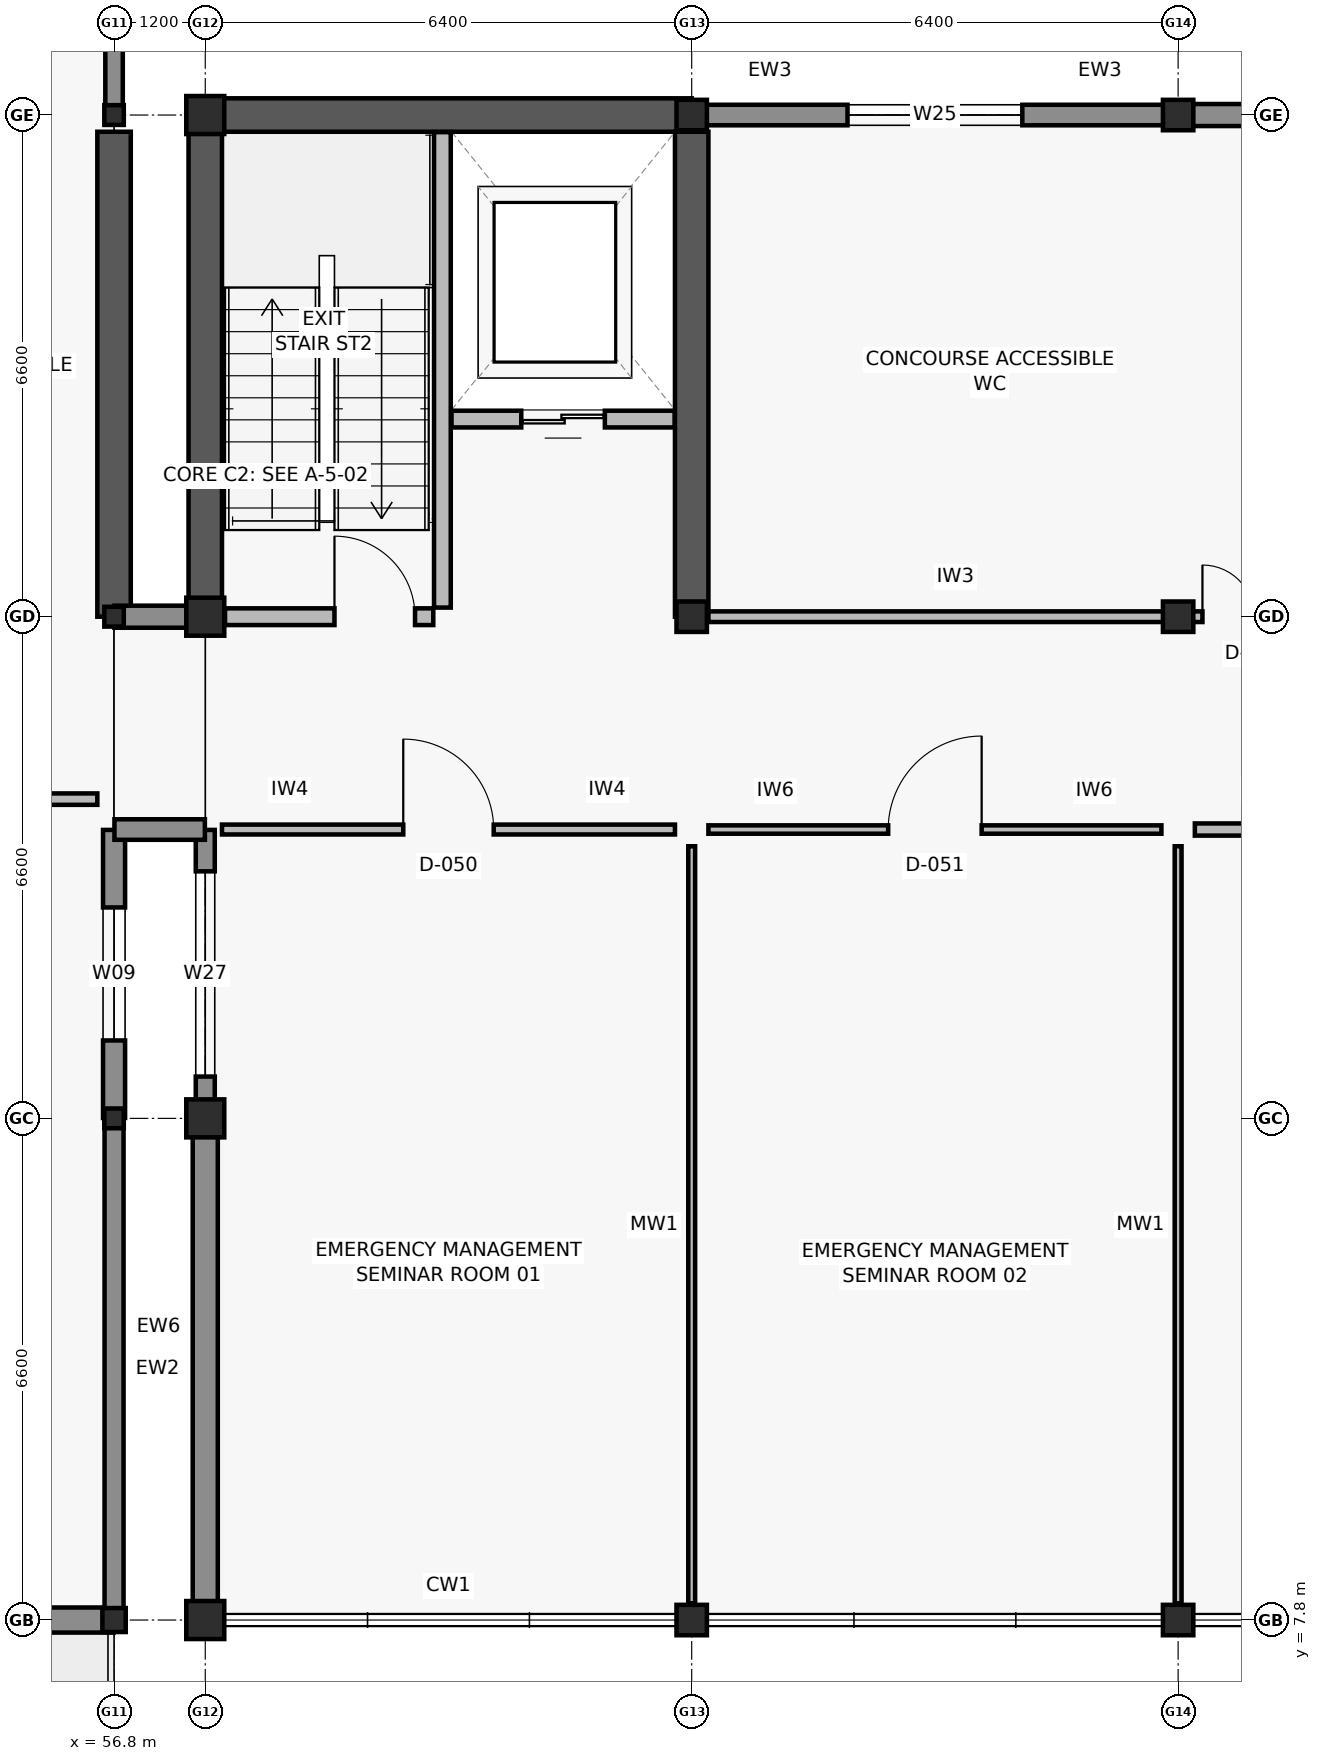
"""IFC4 building model, lengths in metres.
Left out: names, types, materials, properties, quantities, classifications, styles, units other than length and angle.
Written with IfcOpenShell. Run it as: python <this file> out.ifc"""

import sys

from ifc_helpers import new_model, si_unit, direction, frame, frame_2d, origin, origin_2d, place, context, subcontext, project, spatial, rectangle, i_section, extrude, element, fill, save


model = new_model("IFC4")
c1 = context("Model", 3, precision=1e-05, world=origin(), true_north=direction((0.0, 1.0)))
c2 = subcontext(c1, "Body", "Model", "MODEL_VIEW")
j1 = project(units=[si_unit("LENGTHUNIT", "METRE"), si_unit("PLANEANGLEUNIT", "RADIAN")], contexts=[c1])
p1 = place(None, origin())
s1 = spatial("IfcSite", under=j1, at=p1, CompositionType="ELEMENT")
p2 = place(p1, origin())
s2 = spatial("IfcBuilding", under=s1, at=p2, CompositionType="ELEMENT")
p3 = place(p2, frame((0.0, 0.0, 5.4)))
s3 = spatial("IfcBuildingStorey", under=s2, at=p3, CompositionType="ELEMENT", Elevation=5.4)
p4 = place(p3, frame((56.8, 7.8, 0.0), z_axis=(0.0, 0.0, 1.0), x_axis=(1.0, 0.0, 0.0)))
e1 = element("IfcColumn", 1, at=p4, inside=s3, PredefinedType="COLUMN", context=c2, shape_type="SweptSolid", body=[
    extrude(i_section(OverallWidth=0.307, OverallDepth=0.315, WebThickness=0.012, FlangeThickness=0.019, FilletRadius=0.017, at=origin_2d()), origin(), (0.0, 0.0, 1.0), 4.2),
])
for number, where, z_axis, x_axis in (
    (2, (56.8, 14.4, 0.0), (0.0, 0.0, 1.0), (1.0, 0.0, 0.0)),
    (3, (56.8, 21.0, 0.0), (0.0, 0.0, 1.0), (1.0, 0.0, 0.0)),
    (4, (56.8, 27.6, 0.0), (0.0, 0.0, 1.0), (1.0, 0.0, 0.0)),
):
    element("IfcColumn", number, at=place(p3, frame(where, z_axis=z_axis, x_axis=x_axis)), inside=s3, PredefinedType="COLUMN", context=c2, shape_type="SweptSolid", body=[
        extrude(i_section(OverallWidth=0.256, OverallDepth=0.26, WebThickness=0.01, FlangeThickness=0.017, FilletRadius=0.013, at=origin_2d()), origin(), (0.0, 0.0, 1.0), 4.2),
    ])
for number, where, z_axis, x_axis in (
    (5, (58.0, 7.8, 0.0), (0.0, 0.0, 1.0), (1.0, 0.0, 0.0)),
    (6, (58.0, 14.4, 0.0), (0.0, 0.0, 1.0), (1.0, 0.0, 0.0)),
    (7, (58.0, 21.0, 0.0), (0.0, 0.0, 1.0), (1.0, 0.0, 0.0)),
    (8, (58.0, 27.6, 0.0), (0.0, 0.0, 1.0), (1.0, 0.0, 0.0)),
):
    element("IfcColumn", number, at=place(p3, frame(where, z_axis=z_axis, x_axis=x_axis)), inside=s3, PredefinedType="COLUMN", context=c2, shape_type="SweptSolid", body=[
        extrude(i_section(OverallWidth=0.5, OverallDepth=0.5, WebThickness=0.02, FlangeThickness=0.036, at=origin_2d()), origin(), (0.0, 0.0, 1.0), 4.2),
    ])
for number, where, z_axis, x_axis in (
    (9, (64.4, 7.8, 0.0), (0.0, 0.0, 1.0), (1.0, 0.0, 0.0)),
    (10, (64.4, 21.0, 0.0), (0.0, 0.0, 1.0), (1.0, 0.0, 0.0)),
    (11, (64.4, 27.6, 0.0), (0.0, 0.0, 1.0), (1.0, 0.0, 0.0)),
    (12, (70.8, 7.8, 0.0), (0.0, 0.0, 1.0), (1.0, 0.0, 0.0)),
    (13, (70.8, 21.0, 0.0), (0.0, 0.0, 1.0), (1.0, 0.0, 0.0)),
    (14, (70.8, 27.6, 0.0), (0.0, 0.0, 1.0), (1.0, 0.0, 0.0)),
):
    element("IfcColumn", number, at=place(p3, frame(where, z_axis=z_axis, x_axis=x_axis)), inside=s3, PredefinedType="COLUMN", context=c2, shape_type="SweptSolid", body=[
        extrude(i_section(OverallWidth=0.4, OverallDepth=0.4, WebThickness=0.02, FlangeThickness=0.032, at=origin_2d()), origin(), (0.0, 0.0, 1.0), 4.2),
    ])
p5 = place(p3, frame((56.8, 21.0, 0.0), z_axis=(0.0, 0.0, 1.0), x_axis=(0.0, 1.0, 0.0)))
e15 = element("IfcWall", 15, at=p5, inside=s3, PredefinedType="SHEAR", context=c2, shape_type="SweptSolid", body=[
    extrude(rectangle(XDim=6.38, YDim=0.44, at=frame_2d((3.19, 0.0))), origin(), (0.0, 0.0, 1.0), 3.96),
])
p6 = place(p3, frame((58.0, 27.6, 0.0), z_axis=(0.0, 0.0, 1.0), x_axis=(1.0, 0.0, 0.0)))
e16 = element("IfcWall", 16, at=p6, inside=s3, PredefinedType="SHEAR", context=c2, shape_type="SweptSolid", body=[
    extrude(rectangle(XDim=6.4, YDim=0.44, at=frame_2d((3.2, 0.0))), origin(), (0.0, 0.0, 1.0), 3.96),
])
for number, where, z_axis, x_axis in (
    (17, (58.0, 21.0, 0.0), (0.0, 0.0, 1.0), (0.0, 1.0, 0.0)),
    (18, (64.4, 21.0, 0.0), (0.0, 0.0, 1.0), (0.0, 1.0, 0.0)),
):
    element("IfcWall", number, at=place(p3, frame(where, z_axis=z_axis, x_axis=x_axis)), inside=s3, PredefinedType="SHEAR", context=c2, shape_type="SweptSolid", body=[
        extrude(rectangle(XDim=6.38, YDim=0.44, at=frame_2d((3.19, 0.0))), origin(), (0.0, 0.0, 1.0), 3.96),
    ])
p7 = place(p3, frame((56.795, 7.8, 0.0), z_axis=(0.0, 0.0, 1.0), x_axis=(-1.0, 0.0, 0.0)))
e19 = element("IfcWall", 19, at=p7, inside=s3, PredefinedType="SOLIDWALL", context=c2, shape_type="SweptSolid", body=[
    extrude(rectangle(XDim=5.59, YDim=0.33, at=frame_2d((2.795, 0.0))), origin(), (0.0, 0.0, 1.0), 3.32),
])
p8 = place(p7, frame((2.055, 0.0, 0.0)))
e20 = element("IfcOpeningElement", 20, at=p8, cuts=e19, PredefinedType="OPENING", context=c2, shape_type="SweptSolid", body=[
    extrude(rectangle(XDim=1.48, YDim=2.16, at=frame_2d((0.74, 1.08))), frame((0.0, 0.175, 0.0), z_axis=(0.0, -1.0, 0.0), x_axis=(1.0, 0.0, 0.0)), (0.0, 0.0, 1.0), 0.35),
])
p9 = place(p3, frame((56.8, 14.395, 0.0), z_axis=(0.0, 0.0, 1.0), x_axis=(0.0, -1.0, 0.0)))
e21 = element("IfcWall", 21, at=p9, inside=s3, PredefinedType="SOLIDWALL", context=c2, shape_type="SweptSolid", body=[
    extrude(rectangle(XDim=6.59, YDim=0.25, at=frame_2d((3.295, 0.0))), origin(), (0.0, 0.0, 1.0), 3.32),
])
p10 = place(p3, frame((56.8, 18.195, 0.0), z_axis=(0.0, 0.0, 1.0), x_axis=(0.0, -1.0, 0.0)))
e22 = element("IfcWall", 22, at=p10, inside=s3, PredefinedType="SOLIDWALL", context=c2, shape_type="SweptSolid", body=[
    extrude(rectangle(XDim=3.79, YDim=0.29, at=frame_2d((1.895, 0.0))), origin(), (0.0, 0.0, 1.0), 3.32),
])
p11 = place(p10, frame((1.02, 0.0, 0.8)))
e23 = element("IfcOpeningElement", 23, at=p11, cuts=e22, PredefinedType="OPENING", context=c2, shape_type="SweptSolid", body=[
    extrude(rectangle(XDim=1.75, YDim=1.8, at=frame_2d((0.875, 0.9))), frame((0.0, 0.155, 0.0), z_axis=(0.0, -1.0, 0.0), x_axis=(1.0, 0.0, 0.0)), (0.0, 0.0, 1.0), 0.31),
])
p12 = place(p3, frame((56.8, 34.195, 0.0), z_axis=(0.0, 0.0, 1.0), x_axis=(0.0, -1.0, 0.0)))
e24 = element("IfcWall", 24, at=p12, inside=s3, PredefinedType="SOLIDWALL", context=c2, shape_type="SweptSolid", body=[
    extrude(rectangle(XDim=6.59, YDim=0.23, at=frame_2d((3.295, 0.0))), origin(), (0.0, 0.0, 1.0), 3.32),
])
p13 = place(p12, frame((0.913, 0.0, 0.8)))
e25 = element("IfcOpeningElement", 25, at=p13, cuts=e24, PredefinedType="OPENING", context=c2, shape_type="SweptSolid", body=[
    extrude(rectangle(XDim=2.2, YDim=1.8, at=frame_2d((1.1, 0.9))), frame((0.0, 0.125, 0.0), z_axis=(0.0, -1.0, 0.0), x_axis=(1.0, 0.0, 0.0)), (0.0, 0.0, 1.0), 0.25),
])
p14 = place(p3, frame((64.405, 27.6, 0.0), z_axis=(0.0, 0.0, 1.0), x_axis=(1.0, 0.0, 0.0)))
e26 = element("IfcWall", 26, at=p14, inside=s3, PredefinedType="SOLIDWALL", context=c2, shape_type="SweptSolid", body=[
    extrude(rectangle(XDim=6.39, YDim=0.27, at=frame_2d((3.195, 0.0))), origin(), (0.0, 0.0, 1.0), 3.32),
])
p15 = place(p14, frame((2.045, 0.0, 0.72)))
e27 = element("IfcOpeningElement", 27, at=p15, cuts=e26, PredefinedType="OPENING", context=c2, shape_type="SweptSolid", body=[
    extrude(rectangle(XDim=2.3, YDim=1.15, at=frame_2d((1.15, 0.575))), frame((0.0, 0.145, 0.0), z_axis=(0.0, -1.0, 0.0), x_axis=(1.0, 0.0, 0.0)), (0.0, 0.0, 1.0), 0.29),
])
p16 = place(p3, frame((70.805, 27.6, 0.0), z_axis=(0.0, 0.0, 1.0), x_axis=(1.0, 0.0, 0.0)))
e28 = element("IfcWall", 28, at=p16, inside=s3, PredefinedType="SOLIDWALL", context=c2, shape_type="SweptSolid", body=[
    extrude(rectangle(XDim=6.39, YDim=0.29, at=frame_2d((3.195, 0.0))), origin(), (0.0, 0.0, 1.0), 3.32),
])
p17 = place(p16, frame((1.945, 0.0, 0.72)))
e29 = element("IfcOpeningElement", 29, at=p17, cuts=e28, PredefinedType="OPENING", context=c2, shape_type="SweptSolid", body=[
    extrude(rectangle(XDim=2.5, YDim=1.15, at=frame_2d((1.25, 0.575))), frame((0.0, 0.155, 0.0), z_axis=(0.0, -1.0, 0.0), x_axis=(1.0, 0.0, 0.0)), (0.0, 0.0, 1.0), 0.31),
])
p18 = place(p3, frame((58.0, 7.805, 0.0), z_axis=(0.0, 0.0, 1.0), x_axis=(0.0, 1.0, 0.0)))
e30 = element("IfcWall", 30, at=p18, inside=s3, PredefinedType="SOLIDWALL", context=c2, shape_type="SweptSolid", body=[
    extrude(rectangle(XDim=6.59, YDim=0.33, at=frame_2d((3.295, 0.0))), origin(), (0.0, 0.0, 1.0), 3.32),
])
p19 = place(p3, frame((58.0, 14.405, 0.0), z_axis=(0.0, 0.0, 1.0), x_axis=(0.0, 1.0, 0.0)))
e31 = element("IfcWall", 31, at=p19, inside=s3, PredefinedType="SOLIDWALL", context=c2, shape_type="SweptSolid", body=[
    extrude(rectangle(XDim=3.79, YDim=0.25, at=frame_2d((1.895, 0.0))), origin(), (0.0, 0.0, 1.0), 3.32),
])
p20 = place(p19, frame((0.545, 0.0, 0.72)))
e32 = element("IfcOpeningElement", 32, at=p20, cuts=e31, PredefinedType="OPENING", context=c2, shape_type="SweptSolid", body=[
    extrude(rectangle(XDim=2.7, YDim=1.15, at=frame_2d((1.35, 0.575))), frame((0.0, 0.135, 0.0), z_axis=(0.0, -1.0, 0.0), x_axis=(1.0, 0.0, 0.0)), (0.0, 0.0, 1.0), 0.27),
])
p21 = place(p3, frame((57.995, 18.2, 0.0), z_axis=(0.0, 0.0, 1.0), x_axis=(-1.0, 0.0, 0.0)))
e33 = element("IfcWall", 33, at=p21, inside=s3, PredefinedType="SOLIDWALL", context=c2, shape_type="SweptSolid", body=[
    extrude(rectangle(XDim=1.19, YDim=0.27, at=frame_2d((0.595, 0.0))), origin(), (0.0, 0.0, 1.0), 3.32),
])
p22 = place(p3, frame((56.805, 21.0, 0.0), z_axis=(0.0, 0.0, 1.0), x_axis=(1.0, 0.0, 0.0)))
e34 = element("IfcWall", 34, at=p22, inside=s3, PredefinedType="SOLIDWALL", context=c2, shape_type="SweptSolid", body=[
    extrude(rectangle(XDim=1.19, YDim=0.29, at=frame_2d((0.595, 0.0))), origin(), (0.0, 0.0, 1.0), 3.32),
])
p23 = place(p3, frame((61.12, 21.12, 0.0), z_axis=(0.0, 0.0, 1.0), x_axis=(0.0, 1.0, 0.0)))
e35 = element("IfcWall", 35, at=p23, inside=s3, PredefinedType="SOLIDWALL", context=c2, shape_type="SweptSolid", body=[
    extrude(rectangle(XDim=6.255, YDim=0.22, at=frame_2d((3.127, 0.0))), origin(), (0.0, 0.0, 1.0), 3.96),
])
p24 = place(p3, frame((58.26, 21.0, 0.0), z_axis=(0.0, 0.0, 1.0), x_axis=(1.0, 0.0, 0.0)))
e36 = element("IfcWall", 36, at=p24, inside=s3, PredefinedType="SOLIDWALL", context=c2, shape_type="SweptSolid", body=[
    extrude(rectangle(XDim=2.74, YDim=0.22, at=frame_2d((1.37, 0.0))), origin(), (0.0, 0.0, 1.0), 3.32),
])
p25 = place(p24, frame((1.44, 0.0, 0.0)))
e37 = element("IfcOpeningElement", 37, at=p25, cuts=e36, PredefinedType="OPENING", context=c2, shape_type="SweptSolid", body=[
    extrude(rectangle(XDim=1.06, YDim=2.1, at=frame_2d((0.53, 1.05))), frame((0.0, 0.12, 0.0), z_axis=(0.0, -1.0, 0.0), x_axis=(1.0, 0.0, 0.0)), (0.0, 0.0, 1.0), 0.24),
])
p26 = place(p3, frame((61.24, 23.6, 0.0), z_axis=(0.0, 0.0, 1.0), x_axis=(1.0, 0.0, 0.0)))
e38 = element("IfcWall", 38, at=p26, inside=s3, PredefinedType="SOLIDWALL", context=c2, shape_type="SweptSolid", body=[
    extrude(rectangle(XDim=2.935, YDim=0.22, at=frame_2d((1.468, 0.0))), origin(), (0.0, 0.0, 1.0), 3.96),
])
p27 = place(p26, frame((0.917, 0.0, 0.0)))
e39 = element("IfcOpeningElement", 39, at=p27, cuts=e38, PredefinedType="OPENING", context=c2, shape_type="SweptSolid", body=[
    extrude(rectangle(XDim=1.1, YDim=2.1, at=frame_2d((0.55, 1.05))), frame((0.0, 0.12, 0.0), z_axis=(0.0, -1.0, 0.0), x_axis=(1.0, 0.0, 0.0)), (0.0, 0.0, 1.0), 0.24),
])
p28 = place(p3, frame((51.42, 18.6, 0.0), z_axis=(0.0, 0.0, 1.0), x_axis=(1.0, 0.0, 0.0)))
e40 = element("IfcWall", 40, at=p28, inside=s3, PredefinedType="PARTITIONING", context=c2, shape_type="SweptSolid", body=[
    extrude(rectangle(XDim=5.16, YDim=0.15, at=frame_2d((2.58, 0.0))), origin(), (0.0, 0.0, 1.0), 3.3),
])
p29 = place(p28, frame((2.005, 0.0, 0.0)))
e41 = element("IfcOpeningElement", 41, at=p29, cuts=e40, PredefinedType="OPENING", context=c2, shape_type="SweptSolid", body=[
    extrude(rectangle(XDim=1.15, YDim=2.12, at=frame_2d((0.575, 1.06))), frame((0.0, 0.085, 0.0), z_axis=(0.0, -1.0, 0.0), x_axis=(1.0, 0.0, 0.0)), (0.0, 0.0, 1.0), 0.17),
])
p30 = place(p3, frame((64.4, 8.02, 0.0), z_axis=(0.0, 0.0, 1.0), x_axis=(0.0, 1.0, 0.0)))
e42 = element("IfcWall", 42, at=p30, inside=s3, PredefinedType="MOVABLE", context=c2, shape_type="SweptSolid", body=[
    extrude(rectangle(XDim=9.96, YDim=0.09, at=frame_2d((4.98, 0.0))), origin(), (0.0, 0.0, 1.0), 3.3),
])
p31 = place(p3, frame((58.22, 18.2, 0.0), z_axis=(0.0, 0.0, 1.0), x_axis=(1.0, 0.0, 0.0)))
e43 = element("IfcWall", 43, at=p31, inside=s3, PredefinedType="PARTITIONING", context=c2, shape_type="SweptSolid", body=[
    extrude(rectangle(XDim=5.96, YDim=0.13, at=frame_2d((2.98, 0.0))), origin(), (0.0, 0.0, 1.0), 3.3),
])
p32 = place(p31, frame((2.385, 0.0, 0.0)))
e44 = element("IfcOpeningElement", 44, at=p32, cuts=e43, PredefinedType="OPENING", context=c2, shape_type="SweptSolid", body=[
    extrude(rectangle(XDim=1.19, YDim=2.14, at=frame_2d((0.595, 1.07))), frame((0.0, 0.075, 0.0), z_axis=(0.0, -1.0, 0.0), x_axis=(1.0, 0.0, 0.0)), (0.0, 0.0, 1.0), 0.15),
])
p33 = place(p3, frame((70.8, 8.02, 0.0), z_axis=(0.0, 0.0, 1.0), x_axis=(0.0, 1.0, 0.0)))
e45 = element("IfcWall", 45, at=p33, inside=s3, PredefinedType="MOVABLE", context=c2, shape_type="SweptSolid", body=[
    extrude(rectangle(XDim=9.96, YDim=0.09, at=frame_2d((4.98, 0.0))), origin(), (0.0, 0.0, 1.0), 3.3),
])
p34 = place(p3, frame((64.62, 18.2, 0.0), z_axis=(0.0, 0.0, 1.0), x_axis=(1.0, 0.0, 0.0)))
e46 = element("IfcWall", 46, at=p34, inside=s3, PredefinedType="PARTITIONING", context=c2, shape_type="SweptSolid", body=[
    extrude(rectangle(XDim=5.96, YDim=0.11, at=frame_2d((2.98, 0.0))), origin(), (0.0, 0.0, 1.0), 3.3),
])
p35 = place(p34, frame((2.365, 0.0, 0.0)))
e47 = element("IfcOpeningElement", 47, at=p35, cuts=e46, PredefinedType="OPENING", context=c2, shape_type="SweptSolid", body=[
    extrude(rectangle(XDim=1.23, YDim=2.08, at=frame_2d((0.615, 1.04))), frame((0.0, 0.065, 0.0), z_axis=(0.0, -1.0, 0.0), x_axis=(1.0, 0.0, 0.0)), (0.0, 0.0, 1.0), 0.13),
])
p36 = place(p3, frame((71.02, 18.2, 0.0), z_axis=(0.0, 0.0, 1.0), x_axis=(1.0, 0.0, 0.0)))
e48 = element("IfcWall", 48, at=p36, inside=s3, PredefinedType="PARTITIONING", context=c2, shape_type="SweptSolid", body=[
    extrude(rectangle(XDim=5.96, YDim=0.16, at=frame_2d((2.98, 0.0))), origin(), (0.0, 0.0, 1.0), 3.3),
])
p37 = place(p36, frame((2.345, 0.0, 0.0)))
e49 = element("IfcOpeningElement", 49, at=p37, cuts=e48, PredefinedType="OPENING", context=c2, shape_type="SweptSolid", body=[
    extrude(rectangle(XDim=1.27, YDim=2.1, at=frame_2d((0.635, 1.05))), frame((0.0, 0.09, 0.0), z_axis=(0.0, -1.0, 0.0), x_axis=(1.0, 0.0, 0.0)), (0.0, 0.0, 1.0), 0.18),
])
p38 = place(p3, frame((64.62, 21.0, 0.0), z_axis=(0.0, 0.0, 1.0), x_axis=(1.0, 0.0, 0.0)))
e50 = element("IfcWall", 50, at=p38, inside=s3, PredefinedType="PARTITIONING", context=c2, shape_type="SweptSolid", body=[
    extrude(rectangle(XDim=12.36, YDim=0.14, at=frame_2d((6.18, 0.0))), origin(), (0.0, 0.0, 1.0), 3.3),
])
p39 = place(p38, frame((6.5, 0.0, 0.0)))
e51 = element("IfcOpeningElement", 51, at=p39, cuts=e50, PredefinedType="OPENING", context=c2, shape_type="SweptSolid", body=[
    extrude(rectangle(XDim=1.36, YDim=2.15, at=frame_2d((0.68, 1.075))), frame((0.0, 0.08, 0.0), z_axis=(0.0, -1.0, 0.0), x_axis=(1.0, 0.0, 0.0)), (0.0, 0.0, 1.0), 0.16),
])
p40 = place(p11, origin())
e52 = element("IfcWindow", 52, at=p40, inside=s3, PartitioningType="DOUBLE_PANEL_VERTICAL", PredefinedType="WINDOW", context=c2, shape_type="SweptSolid", body=[
    extrude(rectangle(XDim=1.75, YDim=1.8, at=frame_2d((0.875, 0.9))), frame((0.0, 0.03, 0.0), z_axis=(0.0, -1.0, 0.0), x_axis=(1.0, 0.0, 0.0)), (0.0, 0.0, 1.0), 0.06),
])
fill(e23, e52)
p41 = place(p15, origin())
e53 = element("IfcWindow", 53, at=p41, inside=s3, PartitioningType="DOUBLE_PANEL_VERTICAL", PredefinedType="WINDOW", context=c2, shape_type="SweptSolid", body=[
    extrude(rectangle(XDim=2.3, YDim=1.15, at=frame_2d((1.15, 0.575))), frame((0.0, 0.03, 0.0), z_axis=(0.0, -1.0, 0.0), x_axis=(1.0, 0.0, 0.0)), (0.0, 0.0, 1.0), 0.06),
])
fill(e27, e53)
p42 = place(p20, origin())
e54 = element("IfcWindow", 54, at=p42, inside=s3, PartitioningType="TRIPLE_PANEL_VERTICAL", PredefinedType="WINDOW", context=c2, shape_type="SweptSolid", body=[
    extrude(rectangle(XDim=2.7, YDim=1.15, at=frame_2d((1.35, 0.575))), frame((0.0, 0.03, 0.0), z_axis=(0.0, -1.0, 0.0), x_axis=(1.0, 0.0, 0.0)), (0.0, 0.0, 1.0), 0.06),
])
fill(e32, e54)
p43 = place(p25, origin())
e55 = element("IfcDoor", 55, at=p43, inside=s3, OperationType="SINGLE_SWING_LEFT", PredefinedType="DOOR", context=c2, shape_type="SweptSolid", body=[
    extrude(rectangle(XDim=1.06, YDim=2.1, at=frame_2d((0.53, 1.05))), frame((0.0, 0.025, 0.0), z_axis=(0.0, -1.0, 0.0), x_axis=(1.0, 0.0, 0.0)), (0.0, 0.0, 1.0), 0.05),
])
fill(e37, e55)
p44 = place(p27, origin())
e56 = element("IfcDoor", 56, at=p44, inside=s3, OperationType="DOUBLE_DOOR_SLIDING", PredefinedType="DOOR", context=c2, shape_type="SweptSolid", body=[
    extrude(rectangle(XDim=1.1, YDim=2.1, at=frame_2d((0.55, 1.05))), frame((0.0, 0.025, 0.0), z_axis=(0.0, -1.0, 0.0), x_axis=(1.0, 0.0, 0.0)), (0.0, 0.0, 1.0), 0.05),
])
fill(e39, e56)
p45 = place(p32, origin())
e57 = element("IfcDoor", 57, at=p45, inside=s3, OperationType="SINGLE_SWING_LEFT", PredefinedType="DOOR", context=c2, shape_type="SweptSolid", body=[
    extrude(rectangle(XDim=1.19, YDim=2.14, at=frame_2d((0.595, 1.07))), frame((0.0, 0.025, 0.0), z_axis=(0.0, -1.0, 0.0), x_axis=(1.0, 0.0, 0.0)), (0.0, 0.0, 1.0), 0.05),
])
fill(e44, e57)
p46 = place(p35, origin())
e58 = element("IfcDoor", 58, at=p46, inside=s3, OperationType="SINGLE_SWING_RIGHT", PredefinedType="DOOR", context=c2, shape_type="SweptSolid", body=[
    extrude(rectangle(XDim=1.23, YDim=2.08, at=frame_2d((0.615, 1.04))), frame((0.0, 0.025, 0.0), z_axis=(0.0, -1.0, 0.0), x_axis=(1.0, 0.0, 0.0)), (0.0, 0.0, 1.0), 0.05),
])
fill(e47, e58)
p47 = place(p39, origin())
e59 = element("IfcDoor", 59, at=p47, inside=s3, OperationType="DOUBLE_DOOR_SINGLE_SWING", PredefinedType="DOOR", context=c2, shape_type="SweptSolid", body=[
    extrude(rectangle(XDim=1.36, YDim=2.15, at=frame_2d((0.68, 1.075))), frame((0.0, 0.025, 0.0), z_axis=(0.0, -1.0, 0.0), x_axis=(1.0, 0.0, 0.0)), (0.0, 0.0, 1.0), 0.05),
])
fill(e51, e59)
save(model, sys.argv[1])
